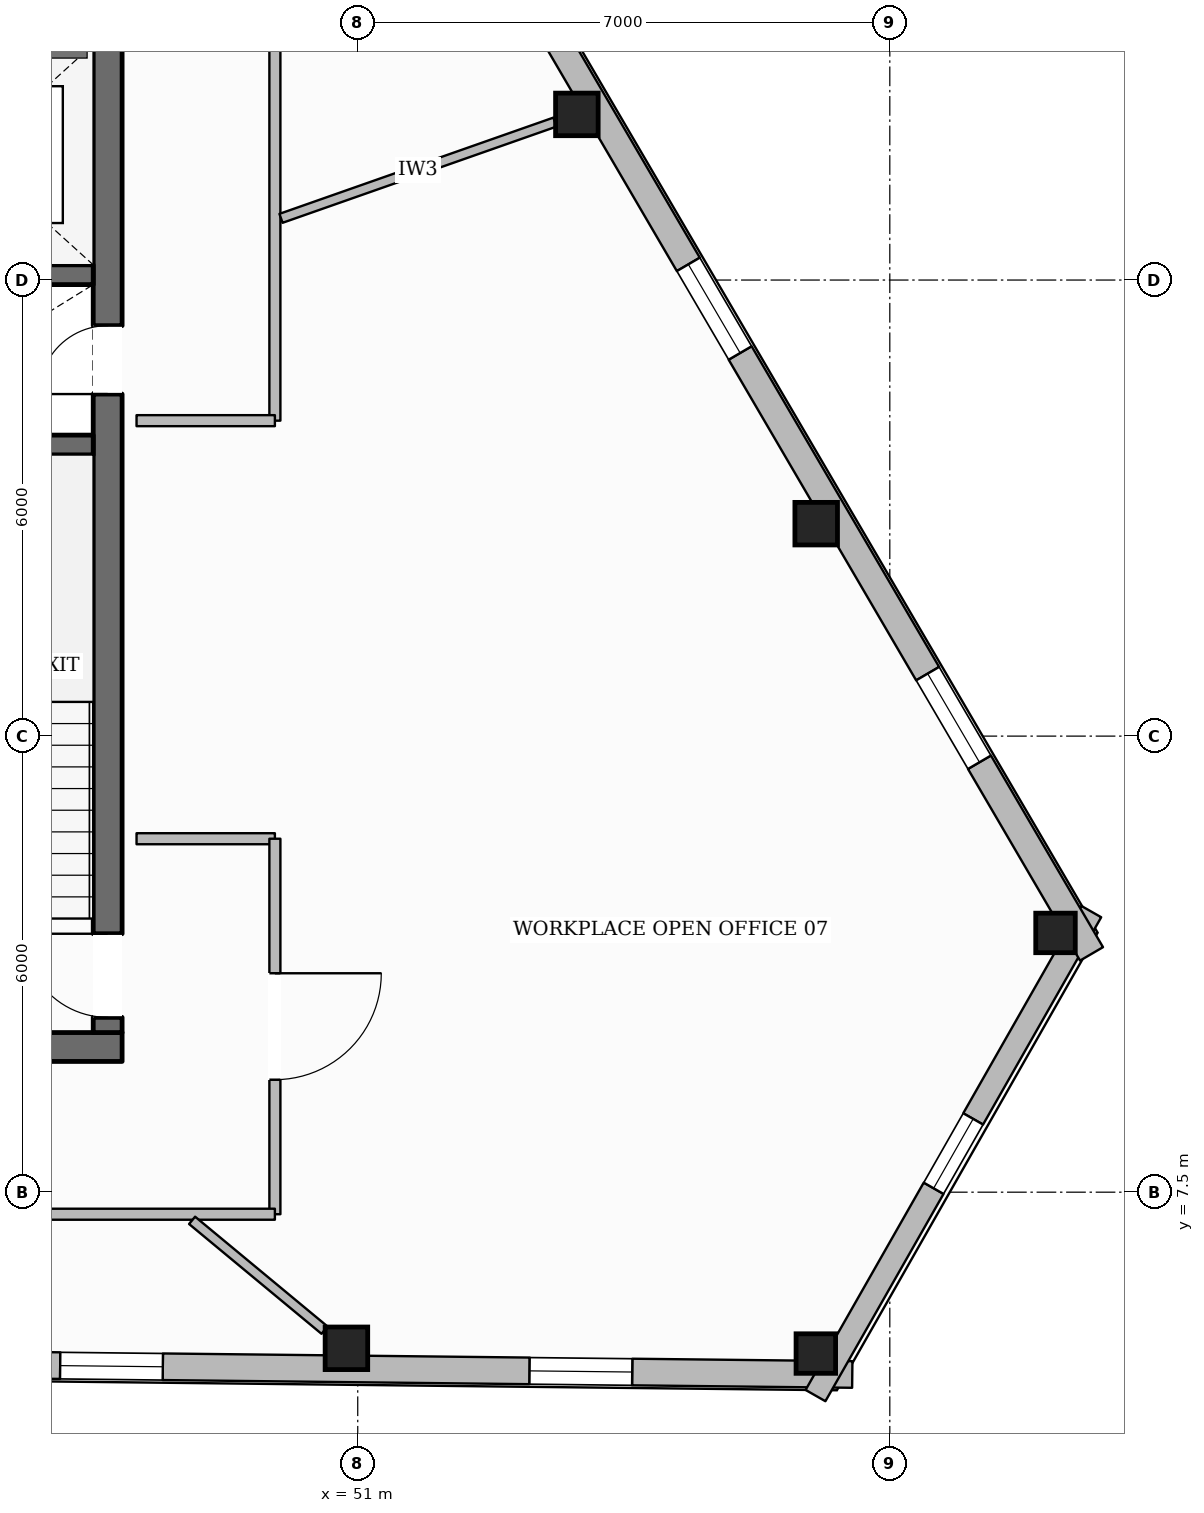
"""IFC4 building model, lengths in metres.
Left out: names, types, materials, properties, quantities, classifications, styles, units other than length and angle.
Written with IfcOpenShell. Run it as: python <this file> out.ifc"""

import sys

from ifc_helpers import new_model, si_unit, direction, frame, frame_2d, origin, origin_2d, place, context, subcontext, project, spatial, rectangle, hollow_rectangle, extrude, element, fill, save


model = new_model("IFC4")
c1 = context("Model", 3, precision=1e-05, world=origin(), true_north=direction((0.0, 1.0)))
c2 = subcontext(c1, "Body", "Model", "MODEL_VIEW")
j1 = project(units=[si_unit("LENGTHUNIT", "METRE"), si_unit("PLANEANGLEUNIT", "RADIAN")], contexts=[c1])
p1 = place(None, origin())
s1 = spatial("IfcSite", under=j1, at=p1, CompositionType="ELEMENT")
p2 = place(p1, origin())
s2 = spatial("IfcBuilding", under=s1, at=p2, CompositionType="ELEMENT")
p3 = place(p2, frame((0.0, 0.0, 258.75)))
s3 = spatial("IfcBuildingStorey", under=s2, at=p3, CompositionType="ELEMENT", Elevation=258.75)
p4 = place(p3, frame((28.1, 9.41, 0.0), z_axis=(0.0, 0.0, 1.0), x_axis=(1.0, 0.0, 0.0)))
e1 = element("IfcWall", 1, at=p4, inside=s3, PredefinedType="SOLIDWALL", context=c2, shape_type="SweptSolid", body=[
    extrude(rectangle(XDim=19.8, YDim=0.38, at=frame_2d((9.9, 0.0))), origin(), (0.0, 0.0, 1.0), 3.61),
])
p5 = place(p4, frame((10.4, 0.0, 0.0)))
e2 = element("IfcOpeningElement", 2, at=p5, cuts=e1, PredefinedType="OPENING", context=c2, shape_type="SweptSolid", body=[
    extrude(rectangle(XDim=1.4, YDim=2.2, at=frame_2d((0.7, 1.1))), frame((0.0, 0.2, 0.0), z_axis=(0.0, -1.0, 0.0), x_axis=(1.0, 0.0, 0.0)), (0.0, 0.0, 1.0), 0.4),
])
p6 = place(p3, frame((47.71, 9.6, 0.0), z_axis=(0.0, 0.0, 1.0), x_axis=(0.0, 1.0, 0.0)))
e3 = element("IfcWall", 3, at=p6, inside=s3, PredefinedType="SOLIDWALL", context=c2, shape_type="SweptSolid", body=[
    extrude(rectangle(XDim=13.0, YDim=0.38, at=frame_2d((6.5, 0.0))), origin(), (0.0, 0.0, 1.0), 3.61),
])
p7 = place(p6, frame((0.2, 0.0, 0.0)))
e4 = element("IfcOpeningElement", 4, at=p7, cuts=e3, PredefinedType="OPENING", context=c2, shape_type="SweptSolid", body=[
    extrude(rectangle(XDim=1.1, YDim=2.15, at=frame_2d((0.55, 1.075))), frame((0.0, 0.2, 0.0), z_axis=(0.0, -1.0, 0.0), x_axis=(1.0, 0.0, 0.0)), (0.0, 0.0, 1.0), 0.4),
])
p8 = place(p6, frame((8.4, 0.0, 0.0)))
e5 = element("IfcOpeningElement", 5, at=p8, cuts=e3, PredefinedType="OPENING", context=c2, shape_type="SweptSolid", body=[
    extrude(rectangle(XDim=0.9, YDim=2.1, at=frame_2d((0.45, 1.05))), frame((0.0, 0.2, 0.0), z_axis=(0.0, -1.0, 0.0), x_axis=(1.0, 0.0, 0.0)), (0.0, 0.0, 1.0), 0.4),
])
for number, where, z_axis, x_axis in (
    (6, (44.32, 17.33, 0.0), (0.0, 0.0, 1.0), (1.0, 0.0, 0.0)),
    (7, (44.32, 19.57, 0.0), (0.0, 0.0, 1.0), (1.0, 0.0, 0.0)),
):
    element("IfcWall", number, at=place(p3, frame(where, z_axis=z_axis, x_axis=x_axis)), inside=s3, PredefinedType="SHEAR", context=c2, shape_type="SweptSolid", body=[
        extrude(rectangle(XDim=3.2, YDim=0.26, at=frame_2d((1.6, 0.0))), origin(), (0.0, 0.0, 1.0), 3.61),
    ])
p9 = place(p3, frame((50.851, 5.446, 0.0), z_axis=(0.0, 0.0, 1.0), x_axis=(1.0, 0.0, 0.0)))
e8 = element("IfcColumn", 8, at=p9, inside=s3, PredefinedType="COLUMN", context=c2, shape_type="SweptSolid", body=[
    extrude(hollow_rectangle(XDim=0.56, YDim=0.56, WallThickness=0.025, at=origin_2d()), origin(), (0.0, 0.0, 1.0), 3.61),
])
for number, where, z_axis, x_axis in (
    (9, (57.027, 5.377, 0.0), (0.0, 0.0, 1.0), (1.0, 0.0, 0.0)),
    (10, (60.18, 10.911, 0.0), (0.0, 0.0, 1.0), (1.0, 0.0, 0.0)),
):
    element("IfcColumn", number, at=place(p3, frame(where, z_axis=z_axis, x_axis=x_axis)), inside=s3, PredefinedType="COLUMN", context=c2, shape_type="SweptSolid", body=[
        extrude(hollow_rectangle(XDim=0.52, YDim=0.52, WallThickness=0.024, at=origin_2d()), origin(), (0.0, 0.0, 1.0), 3.61),
    ])
for number, where, z_axis, x_axis in (
    (11, (57.031, 16.295, 0.0), (0.0, 0.0, 1.0), (1.0, 0.0, 0.0)),
    (12, (53.883, 21.679, 0.0), (0.0, 0.0, 1.0), (1.0, 0.0, 0.0)),
):
    element("IfcColumn", number, at=place(p3, frame(where, z_axis=z_axis, x_axis=x_axis)), inside=s3, PredefinedType="COLUMN", context=c2, shape_type="SweptSolid", body=[
        extrude(hollow_rectangle(XDim=0.56, YDim=0.56, WallThickness=0.025, at=origin_2d()), origin(), (0.0, 0.0, 1.0), 3.61),
    ])
p10 = place(p3, frame((57.506, 5.102, 0.0), z_axis=(0.0, 0.0, 1.0), x_axis=(-0.999937327785, 0.011195557226, 0.0)))
e13 = element("IfcWall", 13, at=p10, inside=s3, PredefinedType="STANDARD", context=c2, shape_type="SweptSolid", body=[
    extrude(rectangle(XDim=38.01, YDim=0.35, at=frame_2d((19.005, 0.0))), origin(), (0.0, 0.0, 1.0), 3.196),
])
p11 = place(p10, frame((33.775, 0.0, 0.65)))
e14 = element("IfcOpeningElement", 14, at=p11, cuts=e13, PredefinedType="OPENING", context=c2, shape_type="SweptSolid", body=[
    extrude(rectangle(XDim=1.35, YDim=1.75, at=frame_2d((0.675, 0.875))), frame((0.0, 0.185, 0.0), z_axis=(0.0, -1.0, 0.0), x_axis=(1.0, 0.0, 0.0)), (0.0, 0.0, 1.0), 0.37),
])
p12 = place(p10, frame((27.599, 0.0, 0.65)))
e15 = element("IfcOpeningElement", 15, at=p12, cuts=e13, PredefinedType="OPENING", context=c2, shape_type="SweptSolid", body=[
    extrude(rectangle(XDim=1.35, YDim=1.75, at=frame_2d((0.675, 0.875))), frame((0.0, 0.185, 0.0), z_axis=(0.0, -1.0, 0.0), x_axis=(1.0, 0.0, 0.0)), (0.0, 0.0, 1.0), 0.37),
])
p13 = place(p10, frame((15.247, 0.0, 0.65)))
e16 = element("IfcOpeningElement", 16, at=p13, cuts=e13, PredefinedType="OPENING", context=c2, shape_type="SweptSolid", body=[
    extrude(rectangle(XDim=1.35, YDim=1.75, at=frame_2d((0.675, 0.875))), frame((0.0, 0.185, 0.0), z_axis=(0.0, -1.0, 0.0), x_axis=(1.0, 0.0, 0.0)), (0.0, 0.0, 1.0), 0.37),
])
p14 = place(p10, frame((9.071, 0.0, 0.65)))
e17 = element("IfcOpeningElement", 17, at=p14, cuts=e13, PredefinedType="OPENING", context=c2, shape_type="SweptSolid", body=[
    extrude(rectangle(XDim=1.35, YDim=1.75, at=frame_2d((0.675, 0.875))), frame((0.0, 0.185, 0.0), z_axis=(0.0, -1.0, 0.0), x_axis=(1.0, 0.0, 0.0)), (0.0, 0.0, 1.0), 0.37),
])
p15 = place(p10, frame((2.896, 0.0, 0.65)))
e18 = element("IfcOpeningElement", 18, at=p15, cuts=e13, PredefinedType="OPENING", context=c2, shape_type="SweptSolid", body=[
    extrude(rectangle(XDim=1.35, YDim=1.75, at=frame_2d((0.675, 0.875))), frame((0.0, 0.185, 0.0), z_axis=(0.0, -1.0, 0.0), x_axis=(1.0, 0.0, 0.0)), (0.0, 0.0, 1.0), 0.37),
])
p16 = place(p3, frame((60.651, 11.191, 0.0), z_axis=(0.0, 0.0, 1.0), x_axis=(-0.495112521008, -0.868828862056, 0.0)))
e19 = element("IfcWall", 19, at=p16, inside=s3, PredefinedType="STANDARD", context=c2, shape_type="SweptSolid", body=[
    extrude(rectangle(XDim=7.328, YDim=0.3, at=frame_2d((3.664, 0.0))), origin(), (0.0, 0.0, 1.0), 3.196),
])
p17 = place(p16, frame((3.139, 0.0, 0.65)))
e20 = element("IfcOpeningElement", 20, at=p17, cuts=e19, PredefinedType="OPENING", context=c2, shape_type="SweptSolid", body=[
    extrude(rectangle(XDim=1.05, YDim=1.7, at=frame_2d((0.525, 0.85))), frame((0.0, 0.16, 0.0), z_axis=(0.0, -1.0, 0.0), x_axis=(1.0, 0.0, 0.0)), (0.0, 0.0, 1.0), 0.32),
])
p18 = place(p3, frame((41.284, 43.76, 0.0), z_axis=(0.0, 0.0, 1.0), x_axis=(0.50479404613, -0.863239810824, 0.0)))
e21 = element("IfcWall", 21, at=p18, inside=s3, PredefinedType="STANDARD", context=c2, shape_type="SweptSolid", body=[
    extrude(rectangle(XDim=38.372, YDim=0.35, at=frame_2d((19.186, 0.0))), origin(), (0.0, 0.0, 1.0), 3.196),
])
p19 = place(p18, frame((34.102, 0.0, 0.65)))
e22 = element("IfcOpeningElement", 22, at=p19, cuts=e21, PredefinedType="OPENING", context=c2, shape_type="SweptSolid", body=[
    extrude(rectangle(XDim=1.35, YDim=1.75, at=frame_2d((0.675, 0.875))), frame((0.0, 0.185, 0.0), z_axis=(0.0, -1.0, 0.0), x_axis=(1.0, 0.0, 0.0)), (0.0, 0.0, 1.0), 0.37),
])
p20 = place(p18, frame((27.864, 0.0, 0.65)))
e23 = element("IfcOpeningElement", 23, at=p20, cuts=e21, PredefinedType="OPENING", context=c2, shape_type="SweptSolid", body=[
    extrude(rectangle(XDim=1.35, YDim=1.75, at=frame_2d((0.675, 0.875))), frame((0.0, 0.185, 0.0), z_axis=(0.0, -1.0, 0.0), x_axis=(1.0, 0.0, 0.0)), (0.0, 0.0, 1.0), 0.37),
])
p21 = place(p18, frame((15.39, 0.0, 0.65)))
e24 = element("IfcOpeningElement", 24, at=p21, cuts=e21, PredefinedType="OPENING", context=c2, shape_type="SweptSolid", body=[
    extrude(rectangle(XDim=1.35, YDim=1.75, at=frame_2d((0.675, 0.875))), frame((0.0, 0.185, 0.0), z_axis=(0.0, -1.0, 0.0), x_axis=(1.0, 0.0, 0.0)), (0.0, 0.0, 1.0), 0.37),
])
p22 = place(p18, frame((9.153, 0.0, 0.65)))
e25 = element("IfcOpeningElement", 25, at=p22, cuts=e21, PredefinedType="OPENING", context=c2, shape_type="SweptSolid", body=[
    extrude(rectangle(XDim=1.35, YDim=1.75, at=frame_2d((0.675, 0.875))), frame((0.0, 0.185, 0.0), z_axis=(0.0, -1.0, 0.0), x_axis=(1.0, 0.0, 0.0)), (0.0, 0.0, 1.0), 0.37),
])
p23 = place(p18, frame((2.915, 0.0, 0.65)))
e26 = element("IfcOpeningElement", 26, at=p23, cuts=e21, PredefinedType="OPENING", context=c2, shape_type="SweptSolid", body=[
    extrude(rectangle(XDim=1.35, YDim=1.75, at=frame_2d((0.675, 0.875))), frame((0.0, 0.185, 0.0), z_axis=(0.0, -1.0, 0.0), x_axis=(1.0, 0.0, 0.0)), (0.0, 0.0, 1.0), 0.37),
])
p24 = place(p3, frame((49.91, 24.99, 0.0), z_axis=(0.0, 0.0, 1.0), x_axis=(0.0, -1.0, 0.0)))
e27 = element("IfcWall", 27, at=p24, inside=s3, PredefinedType="PARTITIONING", context=c2, shape_type="SweptSolid", body=[
    extrude(rectangle(XDim=7.34, YDim=0.145, at=frame_2d((3.67, 0.0))), origin(), (0.0, 0.0, 1.0), 3.349),
])
for number, where, z_axis, x_axis in (
    (28, (49.91, 17.65, 0.0), (0.0, 0.0, 1.0), (-1.0, 0.0, 0.0)),
    (29, (48.09, 12.15, 0.0), (0.0, 0.0, 1.0), (1.0, 0.0, 0.0)),
):
    element("IfcWall", number, at=place(p3, frame(where, z_axis=z_axis, x_axis=x_axis)), inside=s3, PredefinedType="PARTITIONING", context=c2, shape_type="SweptSolid", body=[
        extrude(rectangle(XDim=1.82, YDim=0.145, at=frame_2d((0.91, 0.0))), origin(), (0.0, 0.0, 1.0), 3.61),
    ])
p25 = place(p3, frame((49.91, 12.15, 0.0), z_axis=(0.0, 0.0, 1.0), x_axis=(0.0, -1.0, 0.0)))
e30 = element("IfcWall", 30, at=p25, inside=s3, PredefinedType="PARTITIONING", context=c2, shape_type="SweptSolid", body=[
    extrude(rectangle(XDim=4.94, YDim=0.145, at=frame_2d((2.47, 0.0))), origin(), (0.0, 0.0, 1.0), 3.61),
])
p26 = place(p25, frame((1.77, 0.0, 0.0)))
e31 = element("IfcOpeningElement", 31, at=p26, cuts=e30, PredefinedType="OPENING", context=c2, shape_type="SweptSolid", body=[
    extrude(rectangle(XDim=1.4, YDim=2.2, at=frame_2d((0.7, 1.1))), frame((0.0, 0.083, 0.0), z_axis=(0.0, -1.0, 0.0), x_axis=(1.0, 0.0, 0.0)), (0.0, 0.0, 1.0), 0.165),
])
p27 = place(p3, frame((49.91, 7.21, 0.0), z_axis=(0.0, 0.0, 1.0), x_axis=(-1.0, 0.0, 0.0)))
e32 = element("IfcWall", 32, at=p27, inside=s3, PredefinedType="PARTITIONING", context=c2, shape_type="SweptSolid", body=[
    extrude(rectangle(XDim=23.82, YDim=0.145, at=frame_2d((11.91, 0.0))), origin(), (0.0, 0.0, 1.0), 3.61),
])
p28 = place(p27, frame((19.928, 0.0, 0.0)))
e33 = element("IfcOpeningElement", 33, at=p28, cuts=e32, PredefinedType="OPENING", context=c2, shape_type="SweptSolid", body=[
    extrude(rectangle(XDim=0.98, YDim=2.15, at=frame_2d((0.49, 1.075))), frame((0.0, 0.083, 0.0), z_axis=(0.0, -1.0, 0.0), x_axis=(1.0, 0.0, 0.0)), (0.0, 0.0, 1.0), 0.165),
])
p29 = place(p27, frame((8.487, 0.0, 0.0)))
e34 = element("IfcOpeningElement", 34, at=p29, cuts=e32, PredefinedType="OPENING", context=c2, shape_type="SweptSolid", body=[
    extrude(rectangle(XDim=0.98, YDim=2.15, at=frame_2d((0.49, 1.075))), frame((0.0, 0.083, 0.0), z_axis=(0.0, -1.0, 0.0), x_axis=(1.0, 0.0, 0.0)), (0.0, 0.0, 1.0), 0.165),
])
p30 = place(p3, frame((49.99, 20.312, 0.0), z_axis=(0.0, 0.0, 1.0), x_axis=(0.943507124712, 0.331352237986, 0.0)))
e35 = element("IfcWall", 35, at=p30, inside=s3, PredefinedType="PARTITIONING", context=c2, shape_type="SweptSolid", body=[
    extrude(rectangle(XDim=3.82, YDim=0.125, at=frame_2d((1.91, 0.0))), origin(), (0.0, 0.0, 1.0), 3.61),
])
p31 = place(p3, frame((48.821, 7.129, 0.0), z_axis=(0.0, 0.0, 1.0), x_axis=(0.769836810093, -0.63824077418, 0.0)))
e36 = element("IfcWall", 36, at=p31, inside=s3, PredefinedType="PARTITIONING", context=c2, shape_type="SweptSolid", body=[
    extrude(rectangle(XDim=2.263, YDim=0.125, at=frame_2d((1.132, 0.0))), origin(), (0.0, 0.0, 1.0), 3.246),
])
p32 = place(p14, origin())
e37 = element("IfcWindow", 37, at=p32, inside=s3, PartitioningType="SINGLE_PANEL", PredefinedType="WINDOW", context=c2, shape_type="SweptSolid", body=[
    extrude(rectangle(XDim=1.35, YDim=1.75, at=frame_2d((0.675, 0.875))), frame((0.0, 0.03, 0.0), z_axis=(0.0, -1.0, 0.0), x_axis=(1.0, 0.0, 0.0)), (0.0, 0.0, 1.0), 0.06),
])
fill(e17, e37)
p33 = place(p15, origin())
e38 = element("IfcWindow", 38, at=p33, inside=s3, PartitioningType="SINGLE_PANEL", PredefinedType="WINDOW", context=c2, shape_type="SweptSolid", body=[
    extrude(rectangle(XDim=1.35, YDim=1.75, at=frame_2d((0.675, 0.875))), frame((0.0, 0.03, 0.0), z_axis=(0.0, -1.0, 0.0), x_axis=(1.0, 0.0, 0.0)), (0.0, 0.0, 1.0), 0.06),
])
fill(e18, e38)
p34 = place(p19, origin())
e39 = element("IfcWindow", 39, at=p34, inside=s3, PartitioningType="SINGLE_PANEL", PredefinedType="WINDOW", context=c2, shape_type="SweptSolid", body=[
    extrude(rectangle(XDim=1.35, YDim=1.75, at=frame_2d((0.675, 0.875))), frame((0.0, 0.03, 0.0), z_axis=(0.0, -1.0, 0.0), x_axis=(1.0, 0.0, 0.0)), (0.0, 0.0, 1.0), 0.06),
])
fill(e22, e39)
p35 = place(p20, origin())
e40 = element("IfcWindow", 40, at=p35, inside=s3, PartitioningType="SINGLE_PANEL", PredefinedType="WINDOW", context=c2, shape_type="SweptSolid", body=[
    extrude(rectangle(XDim=1.35, YDim=1.75, at=frame_2d((0.675, 0.875))), frame((0.0, 0.03, 0.0), z_axis=(0.0, -1.0, 0.0), x_axis=(1.0, 0.0, 0.0)), (0.0, 0.0, 1.0), 0.06),
])
fill(e23, e40)
p36 = place(p17, origin())
e41 = element("IfcWindow", 41, at=p36, inside=s3, PartitioningType="SINGLE_PANEL", PredefinedType="WINDOW", context=c2, shape_type="SweptSolid", body=[
    extrude(rectangle(XDim=1.05, YDim=1.7, at=frame_2d((0.525, 0.85))), frame((0.0, 0.03, 0.0), z_axis=(0.0, -1.0, 0.0), x_axis=(1.0, 0.0, 0.0)), (0.0, 0.0, 1.0), 0.06),
])
fill(e20, e41)
p37 = place(p7, origin())
e42 = element("IfcDoor", 42, at=p37, inside=s3, OperationType="SINGLE_SWING_RIGHT", PredefinedType="DOOR", context=c2, shape_type="SweptSolid", body=[
    extrude(rectangle(XDim=1.1, YDim=2.15, at=frame_2d((0.55, 1.075))), frame((0.0, 0.025, 0.0), z_axis=(0.0, -1.0, 0.0), x_axis=(1.0, 0.0, 0.0)), (0.0, 0.0, 1.0), 0.05),
])
fill(e4, e42)
p38 = place(p8, origin())
e43 = element("IfcDoor", 43, at=p38, inside=s3, OperationType="SINGLE_SWING_LEFT", PredefinedType="DOOR", context=c2, shape_type="SweptSolid", body=[
    extrude(rectangle(XDim=0.9, YDim=2.1, at=frame_2d((0.45, 1.05))), frame((0.0, 0.025, 0.0), z_axis=(0.0, -1.0, 0.0), x_axis=(1.0, 0.0, 0.0)), (0.0, 0.0, 1.0), 0.05),
])
fill(e5, e43)
p39 = place(p26, origin())
e44 = element("IfcDoor", 44, at=p39, inside=s3, OperationType="SINGLE_SWING_LEFT", PredefinedType="DOOR", context=c2, shape_type="SweptSolid", body=[
    extrude(rectangle(XDim=1.4, YDim=2.2, at=frame_2d((0.7, 1.1))), frame((0.0, 0.025, 0.0), z_axis=(0.0, -1.0, 0.0), x_axis=(1.0, 0.0, 0.0)), (0.0, 0.0, 1.0), 0.05),
])
fill(e31, e44)
save(model, sys.argv[1])
